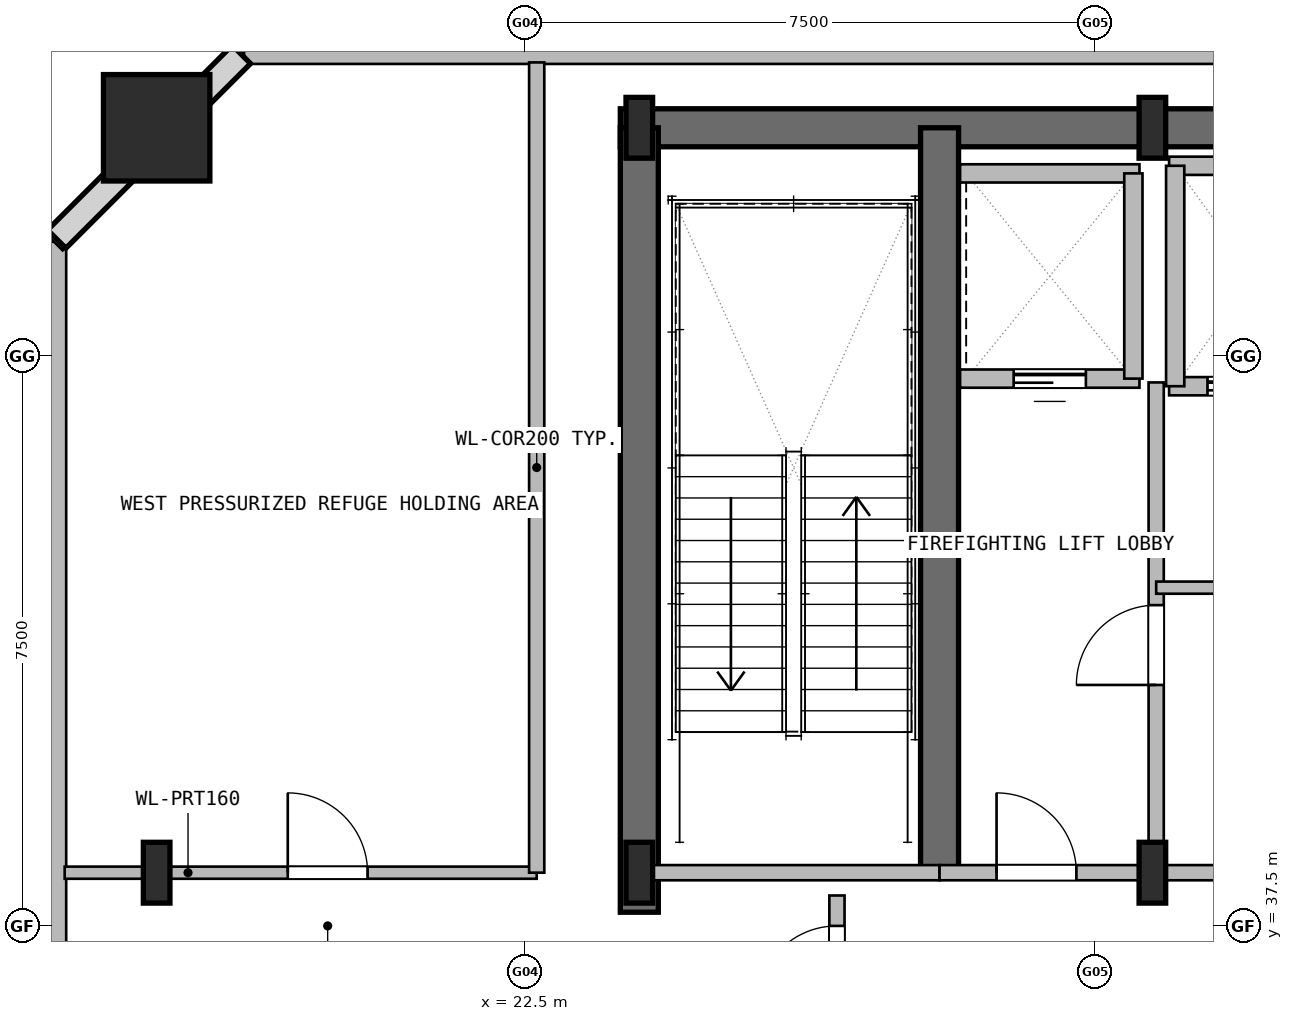
"""IFC4 building model, lengths in metres.
Left out: names, types, materials, properties, quantities, classifications, styles, units other than length and angle.
Written with IfcOpenShell. Run it as: python <this file> out.ifc"""

import sys

from ifc_helpers import new_model, si_unit, direction, frame, frame_2d, origin, origin_2d, place, context, subcontext, project, spatial, rectangle, hollow_rectangle, i_section, extrude, element, fill, save


model = new_model("IFC4")
c1 = context("Model", 3, precision=1e-05, world=origin(), true_north=direction((0.0, 1.0)))
c2 = subcontext(c1, "Body", "Model", "MODEL_VIEW")
j1 = project(units=[si_unit("LENGTHUNIT", "METRE"), si_unit("PLANEANGLEUNIT", "RADIAN")], contexts=[c1])
p1 = place(None, origin())
s1 = spatial("IfcSite", under=j1, at=p1, CompositionType="ELEMENT")
p2 = place(p1, origin())
s2 = spatial("IfcBuilding", under=s1, at=p2, CompositionType="ELEMENT")
p3 = place(p2, frame((0.0, 0.0, 138.0)))
s3 = spatial("IfcBuildingStorey", under=s2, at=p3, CompositionType="ELEMENT", Elevation=138.0)
p4 = place(p3, frame((23.75, 48.0, 0.0), z_axis=(0.0, 0.0, 1.0), x_axis=(1.0, 0.0, 0.0)))
e1 = element("IfcWall", 1, at=p4, inside=s3, PredefinedType="SHEAR", context=c2, shape_type="SweptSolid", body=[
    extrude(rectangle(XDim=27.5, YDim=0.5, at=frame_2d((13.75, 0.0))), origin(), (0.0, 0.0, 1.0), 4.8),
])
p5 = place(p3, frame((24.0, 37.68, 0.0), z_axis=(0.0, 0.0, 1.0), x_axis=(0.0, 1.0, 0.0)))
e2 = element("IfcWall", 2, at=p5, inside=s3, PredefinedType="SHEAR", context=c2, shape_type="SweptSolid", body=[
    extrude(rectangle(XDim=10.32, YDim=0.5, at=frame_2d((5.16, 0.0))), origin(), (0.0, 0.0, 1.0), 4.8),
])
p6 = place(p3, frame((27.95, 38.2, 0.0), z_axis=(0.0, 0.0, 1.0), x_axis=(0.0, 1.0, 0.0)))
e3 = element("IfcWall", 3, at=p6, inside=s3, PredefinedType="SHEAR", context=c2, shape_type="SweptSolid", body=[
    extrude(rectangle(XDim=9.8, YDim=0.5, at=frame_2d((4.9, 0.0))), origin(), (0.0, 0.0, 1.0), 4.8),
])
p7 = place(p3, frame((17.65, 38.2, 0.0), z_axis=(0.0, 0.0, 1.0), x_axis=(1.0, 0.0, 0.0)))
e4 = element("IfcColumn", 4, at=p7, inside=s3, PredefinedType="COLUMN", context=c2, shape_type="SweptSolid", body=[
    extrude(i_section(OverallWidth=0.35, OverallDepth=0.8, WebThickness=0.018, FlangeThickness=0.032, at=origin_2d()), origin(), (0.0, 0.0, 1.0), 4.8),
])
p8 = place(p3, frame((17.65, 48.0, 0.0), z_axis=(0.0, 0.0, 1.0), x_axis=(1.0, 0.0, 0.0)))
e5 = element("IfcColumn", 5, at=p8, inside=s3, PredefinedType="COLUMN", context=c2, shape_type="SweptSolid", body=[
    extrude(hollow_rectangle(XDim=1.4, YDim=1.4, WallThickness=0.036, at=origin_2d()), origin(), (0.0, 0.0, 1.0), 4.8),
])
for number, where, z_axis, x_axis in (
    (6, (24.0, 38.2, 0.0), (0.0, 0.0, 1.0), (1.0, 0.0, 0.0)),
    (7, (24.0, 48.0, 0.0), (0.0, 0.0, 1.0), (1.0, 0.0, 0.0)),
    (8, (30.75, 38.2, 0.0), (0.0, 0.0, 1.0), (1.0, 0.0, 0.0)),
    (9, (30.75, 48.0, 0.0), (0.0, 0.0, 1.0), (1.0, 0.0, 0.0)),
):
    element("IfcColumn", number, at=place(p3, frame(where, z_axis=z_axis, x_axis=x_axis)), inside=s3, PredefinedType="COLUMN", context=c2, shape_type="SweptSolid", body=[
        extrude(i_section(OverallWidth=0.35, OverallDepth=0.8, WebThickness=0.018, FlangeThickness=0.032, at=origin_2d()), origin(), (0.0, 0.0, 1.0), 4.8),
    ])
p9 = place(p3, frame((16.3, 24.0, 0.0), z_axis=(0.0, 0.0, 1.0), x_axis=(0.0, 1.0, 0.0)))
e10 = element("IfcWall", 10, at=p9, inside=s3, PredefinedType="SOLIDWALL", context=c2, shape_type="SweptSolid", body=[
    extrude(rectangle(XDim=22.5, YDim=0.32, at=frame_2d((11.25, 0.0))), origin(), (0.0, 0.0, 1.0), 4.53),
])
p10 = place(p3, frame((16.3, 46.5, 0.0), z_axis=(0.0, 0.0, 1.0), x_axis=(0.707106781187, 0.707106781187, 0.0)))
e11 = element("IfcWall", 11, at=p10, inside=s3, PredefinedType="SOLIDWALL", context=c2, shape_type="SweptSolid", body=[
    extrude(rectangle(XDim=3.536, YDim=0.32, at=frame_2d((1.768, 0.0))), origin(), (0.0, 0.0, 1.0), 4.53),
])
p11 = place(p3, frame((18.8, 49.0, 0.0), z_axis=(0.0, 0.0, 1.0), x_axis=(1.0, 0.0, 0.0)))
e12 = element("IfcWall", 12, at=p11, inside=s3, PredefinedType="SOLIDWALL", context=c2, shape_type="SweptSolid", body=[
    extrude(rectangle(XDim=37.4, YDim=0.32, at=frame_2d((18.7, 0.0))), origin(), (0.0, 0.0, 1.0), 4.53),
])
p12 = place(p3, frame((24.0, 38.2, 0.0), z_axis=(0.0, 0.0, 1.0), x_axis=(1.0, 0.0, 0.0)))
e13 = element("IfcWall", 13, at=p12, inside=s3, PredefinedType="PARTITIONING", context=c2, shape_type="SweptSolid", body=[
    extrude(rectangle(XDim=3.95, YDim=0.2, at=frame_2d((1.975, 0.0))), origin(), (0.0, 0.0, 1.0), 3.88),
])
p13 = place(p3, frame((30.8, 38.2, 0.0), z_axis=(0.0, 0.0, 1.0), x_axis=(0.0, 1.0, 0.0)))
e14 = element("IfcWall", 14, at=p13, inside=s3, PredefinedType="PARTITIONING", context=c2, shape_type="SweptSolid", body=[
    extrude(rectangle(XDim=6.45, YDim=0.2, at=frame_2d((3.225, 0.0))), origin(), (0.0, 0.0, 1.0), 3.88),
])
p14 = place(p13, frame((2.47, 0.0, 0.0)))
e15 = element("IfcOpeningElement", 15, at=p14, cuts=e14, PredefinedType="OPENING", context=c2, shape_type="SweptSolid", body=[
    extrude(rectangle(XDim=1.05, YDim=2.1, at=frame_2d((0.525, 1.05))), frame((0.0, 0.11, 0.0), z_axis=(0.0, -1.0, 0.0), x_axis=(1.0, 0.0, 0.0)), (0.0, 0.0, 1.0), 0.22),
])
p15 = place(p3, frame((27.95, 38.2, 0.0), z_axis=(0.0, 0.0, 1.0), x_axis=(1.0, 0.0, 0.0)))
e16 = element("IfcWall", 16, at=p15, inside=s3, PredefinedType="PARTITIONING", context=c2, shape_type="SweptSolid", body=[
    extrude(rectangle(XDim=2.85, YDim=0.2, at=frame_2d((1.425, 0.0))), origin(), (0.0, 0.0, 1.0), 3.88),
])
p16 = place(p15, frame((0.75, 0.0, 0.0)))
e17 = element("IfcOpeningElement", 17, at=p16, cuts=e16, PredefinedType="OPENING", context=c2, shape_type="SweptSolid", body=[
    extrude(rectangle(XDim=1.05, YDim=2.1, at=frame_2d((0.525, 1.05))), frame((0.0, 0.11, 0.0), z_axis=(0.0, -1.0, 0.0), x_axis=(1.0, 0.0, 0.0)), (0.0, 0.0, 1.0), 0.22),
])
p17 = place(p3, frame((30.8, 38.2, 0.0), z_axis=(0.0, 0.0, 1.0), x_axis=(1.0, 0.0, 0.0)))
e18 = element("IfcWall", 18, at=p17, inside=s3, PredefinedType="PARTITIONING", context=c2, shape_type="SweptSolid", body=[
    extrude(rectangle(XDim=16.35, YDim=0.2, at=frame_2d((8.175, 0.0))), origin(), (0.0, 0.0, 1.0), 3.88),
])
p18 = place(p17, frame((2.1, 0.0, 0.0)))
e19 = element("IfcOpeningElement", 19, at=p18, cuts=e18, PredefinedType="OPENING", context=c2, shape_type="SweptSolid", body=[
    extrude(rectangle(XDim=1.12, YDim=2.1, at=frame_2d((0.56, 1.05))), frame((0.0, 0.11, 0.0), z_axis=(0.0, -1.0, 0.0), x_axis=(1.0, 0.0, 0.0)), (0.0, 0.0, 1.0), 0.22),
])
p19 = place(p17, frame((7.95, 0.0, 0.0)))
e20 = element("IfcOpeningElement", 20, at=p19, cuts=e18, PredefinedType="OPENING", context=c2, shape_type="SweptSolid", body=[
    extrude(rectangle(XDim=1.12, YDim=2.1, at=frame_2d((0.56, 1.05))), frame((0.0, 0.11, 0.0), z_axis=(0.0, -1.0, 0.0), x_axis=(1.0, 0.0, 0.0)), (0.0, 0.0, 1.0), 0.22),
])
p20 = place(p3, frame((28.22, 44.7, 0.0), z_axis=(0.0, 0.0, 1.0), x_axis=(1.0, 0.0, 0.0)))
e21 = element("IfcWall", 21, at=p20, inside=s3, PredefinedType="PARTITIONING", context=c2, shape_type="SweptSolid", body=[
    extrude(rectangle(XDim=2.36, YDim=0.24, at=frame_2d((1.18, 0.0))), origin(), (0.0, 0.0, 1.0), 4.53),
])
p21 = place(p20, frame((0.705, 0.0, 0.0)))
e22 = element("IfcOpeningElement", 22, at=p21, cuts=e21, PredefinedType="OPENING", context=c2, shape_type="SweptSolid", body=[
    extrude(rectangle(XDim=0.95, YDim=2.15, at=frame_2d((0.475, 1.075))), frame((0.0, 0.13, 0.0), z_axis=(0.0, -1.0, 0.0), x_axis=(1.0, 0.0, 0.0)), (0.0, 0.0, 1.0), 0.26),
])
p22 = place(p3, frame((28.22, 47.4, 0.0), z_axis=(0.0, 0.0, 1.0), x_axis=(1.0, 0.0, 0.0)))
e23 = element("IfcWall", 23, at=p22, inside=s3, PredefinedType="PARTITIONING", context=c2, shape_type="SweptSolid", body=[
    extrude(rectangle(XDim=2.36, YDim=0.24, at=frame_2d((1.18, 0.0))), origin(), (0.0, 0.0, 1.0), 4.53),
])
p23 = place(p3, frame((30.5, 44.7, 0.0), z_axis=(0.0, 0.0, 1.0), x_axis=(0.0, 1.0, 0.0)))
e24 = element("IfcWall", 24, at=p23, inside=s3, PredefinedType="PARTITIONING", context=c2, shape_type="SweptSolid", body=[
    extrude(rectangle(XDim=2.7, YDim=0.24, at=frame_2d((1.35, 0.0))), origin(), (0.0, 0.0, 1.0), 3.88),
])
p24 = place(p3, frame((30.97, 44.6, 0.0), z_axis=(0.0, 0.0, 1.0), x_axis=(1.0, 0.0, 0.0)))
e25 = element("IfcWall", 25, at=p24, inside=s3, PredefinedType="PARTITIONING", context=c2, shape_type="SweptSolid", body=[
    extrude(rectangle(XDim=2.26, YDim=0.24, at=frame_2d((1.13, 0.0))), origin(), (0.0, 0.0, 1.0), 4.53),
])
p25 = place(p24, frame((0.505, 0.0, 0.0)))
e26 = element("IfcOpeningElement", 26, at=p25, cuts=e25, PredefinedType="OPENING", context=c2, shape_type="SweptSolid", body=[
    extrude(rectangle(XDim=1.25, YDim=2.2, at=frame_2d((0.625, 1.1))), frame((0.0, 0.13, 0.0), z_axis=(0.0, -1.0, 0.0), x_axis=(1.0, 0.0, 0.0)), (0.0, 0.0, 1.0), 0.26),
])
p26 = place(p3, frame((30.97, 47.5, 0.0), z_axis=(0.0, 0.0, 1.0), x_axis=(1.0, 0.0, 0.0)))
e27 = element("IfcWall", 27, at=p26, inside=s3, PredefinedType="PARTITIONING", context=c2, shape_type="SweptSolid", body=[
    extrude(rectangle(XDim=2.26, YDim=0.24, at=frame_2d((1.13, 0.0))), origin(), (0.0, 0.0, 1.0), 4.53),
])
p27 = place(p3, frame((31.05, 44.6, 0.0), z_axis=(0.0, 0.0, 1.0), x_axis=(0.0, 1.0, 0.0)))
e28 = element("IfcWall", 28, at=p27, inside=s3, PredefinedType="PARTITIONING", context=c2, shape_type="SweptSolid", body=[
    extrude(rectangle(XDim=2.9, YDim=0.24, at=frame_2d((1.45, 0.0))), origin(), (0.0, 0.0, 1.0), 4.53),
])
p28 = place(p3, frame((30.8, 41.95, 0.0), z_axis=(0.0, 0.0, 1.0), x_axis=(1.0, 0.0, 0.0)))
e29 = element("IfcWall", 29, at=p28, inside=s3, PredefinedType="PARTITIONING", context=c2, shape_type="SweptSolid", body=[
    extrude(rectangle(XDim=6.95, YDim=0.16, at=frame_2d((3.475, 0.0))), origin(), (0.0, 0.0, 1.0), 4.53),
])
p29 = place(p28, frame((4.2, 0.0, 0.0)))
e30 = element("IfcOpeningElement", 30, at=p29, cuts=e29, PredefinedType="OPENING", context=c2, shape_type="SweptSolid", body=[
    extrude(rectangle(XDim=0.95, YDim=2.1, at=frame_2d((0.475, 1.05))), frame((0.0, 0.09, 0.0), z_axis=(0.0, -1.0, 0.0), x_axis=(1.0, 0.0, 0.0)), (0.0, 0.0, 1.0), 0.18),
])
p30 = place(p3, frame((16.44, 38.2, 0.0), z_axis=(0.0, 0.0, 1.0), x_axis=(1.0, 0.0, 0.0)))
e31 = element("IfcWall", 31, at=p30, inside=s3, PredefinedType="PARTITIONING", context=c2, shape_type="SweptSolid", body=[
    extrude(rectangle(XDim=6.21, YDim=0.16, at=frame_2d((3.105, 0.0))), origin(), (0.0, 0.0, 1.0), 3.88),
])
p31 = place(p30, frame((2.935, 0.0, 0.0)))
e32 = element("IfcOpeningElement", 32, at=p31, cuts=e31, PredefinedType="OPENING", context=c2, shape_type="SweptSolid", body=[
    extrude(rectangle(XDim=1.05, YDim=2.1, at=frame_2d((0.525, 1.05))), frame((0.0, 0.09, 0.0), z_axis=(0.0, -1.0, 0.0), x_axis=(1.0, 0.0, 0.0)), (0.0, 0.0, 1.0), 0.18),
])
p32 = place(p3, frame((22.65, 38.2, 0.0), z_axis=(0.0, 0.0, 1.0), x_axis=(0.0, 1.0, 0.0)))
e33 = element("IfcWall", 33, at=p32, inside=s3, PredefinedType="PARTITIONING", context=c2, shape_type="SweptSolid", body=[
    extrude(rectangle(XDim=10.66, YDim=0.2, at=frame_2d((5.33, 0.0))), origin(), (0.0, 0.0, 1.0), 4.53),
])
p33 = place(p3, frame((26.6, 21.5, 0.0), z_axis=(0.0, 0.0, 1.0), x_axis=(0.0, 1.0, 0.0)))
e34 = element("IfcWall", 34, at=p33, inside=s3, PredefinedType="PARTITIONING", context=c2, shape_type="SweptSolid", body=[
    extrude(rectangle(XDim=16.4, YDim=0.2, at=frame_2d((8.2, 0.0))), origin(), (0.0, 0.0, 1.0), 4.53),
])
p34 = place(p33, frame((14.95, 0.0, 0.0)))
e35 = element("IfcOpeningElement", 35, at=p34, cuts=e34, PredefinedType="OPENING", context=c2, shape_type="SweptSolid", body=[
    extrude(rectangle(XDim=1.05, YDim=2.1, at=frame_2d((0.525, 1.05))), frame((0.0, 0.11, 0.0), z_axis=(0.0, -1.0, 0.0), x_axis=(1.0, 0.0, 0.0)), (0.0, 0.0, 1.0), 0.22),
])
p35 = place(p14, origin())
e36 = element("IfcDoor", 36, at=p35, inside=s3, OperationType="SINGLE_SWING_LEFT", PredefinedType="DOOR", context=c2, shape_type="SweptSolid", body=[
    extrude(rectangle(XDim=1.05, YDim=2.1, at=frame_2d((0.525, 1.05))), frame((0.0, 0.025, 0.0), z_axis=(0.0, -1.0, 0.0), x_axis=(1.0, 0.0, 0.0)), (0.0, 0.0, 1.0), 0.05),
])
fill(e15, e36)
p36 = place(p16, origin())
e37 = element("IfcDoor", 37, at=p36, inside=s3, OperationType="SINGLE_SWING_RIGHT", PredefinedType="DOOR", context=c2, shape_type="SweptSolid", body=[
    extrude(rectangle(XDim=1.05, YDim=2.1, at=frame_2d((0.525, 1.05))), frame((0.0, 0.025, 0.0), z_axis=(0.0, -1.0, 0.0), x_axis=(1.0, 0.0, 0.0)), (0.0, 0.0, 1.0), 0.05),
])
fill(e17, e37)
p37 = place(p21, origin())
e38 = element("IfcDoor", 38, at=p37, inside=s3, OperationType="SLIDING_TO_LEFT", PredefinedType="DOOR", context=c2, shape_type="SweptSolid", body=[
    extrude(rectangle(XDim=0.95, YDim=2.15, at=frame_2d((0.475, 1.075))), frame((0.0, 0.025, 0.0), z_axis=(0.0, -1.0, 0.0), x_axis=(1.0, 0.0, 0.0)), (0.0, 0.0, 1.0), 0.05),
])
fill(e22, e38)
p38 = place(p25, origin())
e39 = element("IfcDoor", 39, at=p38, inside=s3, OperationType="SLIDING_TO_LEFT", PredefinedType="DOOR", context=c2, shape_type="SweptSolid", body=[
    extrude(rectangle(XDim=1.25, YDim=2.2, at=frame_2d((0.625, 1.1))), frame((0.0, 0.025, 0.0), z_axis=(0.0, -1.0, 0.0), x_axis=(1.0, 0.0, 0.0)), (0.0, 0.0, 1.0), 0.05),
])
fill(e26, e39)
p39 = place(p31, origin())
e40 = element("IfcDoor", 40, at=p39, inside=s3, OperationType="SINGLE_SWING_RIGHT", PredefinedType="DOOR", context=c2, shape_type="SweptSolid", body=[
    extrude(rectangle(XDim=1.05, YDim=2.1, at=frame_2d((0.525, 1.05))), frame((0.0, 0.025, 0.0), z_axis=(0.0, -1.0, 0.0), x_axis=(1.0, 0.0, 0.0)), (0.0, 0.0, 1.0), 0.05),
])
fill(e32, e40)
p40 = place(p34, origin())
e41 = element("IfcDoor", 41, at=p40, inside=s3, OperationType="SINGLE_SWING_RIGHT", PredefinedType="DOOR", context=c2, shape_type="SweptSolid", body=[
    extrude(rectangle(XDim=1.05, YDim=2.1, at=frame_2d((0.525, 1.05))), frame((0.0, 0.025, 0.0), z_axis=(0.0, -1.0, 0.0), x_axis=(1.0, 0.0, 0.0)), (0.0, 0.0, 1.0), 0.05),
])
fill(e35, e41)
save(model, sys.argv[1])
